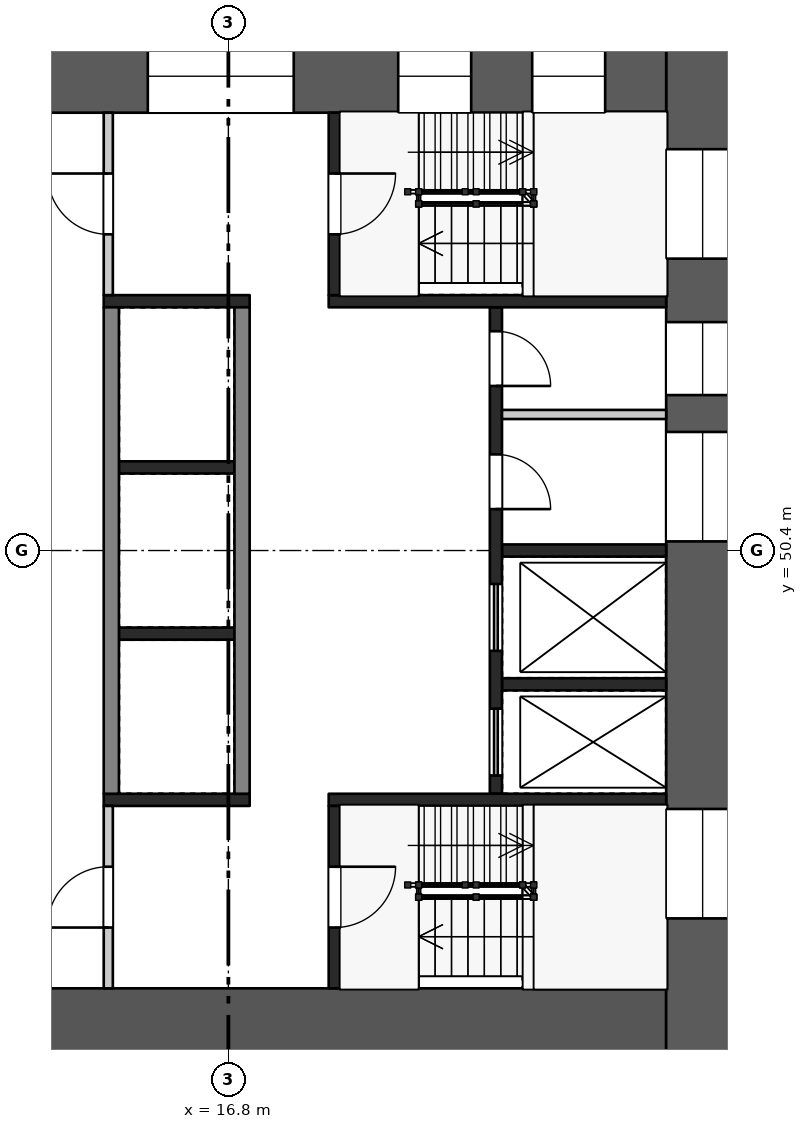
"""IFC4 building model, lengths in metres.
Left out: names, types, materials, properties, quantities, classifications, styles, units other than length and angle.
Written with IfcOpenShell. Run it as: python <this file> out.ifc"""

import sys

from ifc_helpers import new_model, si_unit, direction, frame, frame_2d, origin, place, context, subcontext, project, spatial, rectangle, extrude, element, fill, save


model = new_model("IFC4")
c1 = context("Model", 3, precision=1e-05, world=origin(), true_north=direction((0.0, 1.0)))
c2 = subcontext(c1, "Body", "Model", "MODEL_VIEW")
j1 = project(units=[si_unit("LENGTHUNIT", "METRE"), si_unit("PLANEANGLEUNIT", "RADIAN")], contexts=[c1])
p1 = place(None, origin())
s1 = spatial("IfcSite", under=j1, at=p1, CompositionType="ELEMENT")
p2 = place(p1, origin())
s2 = spatial("IfcBuilding", under=s1, at=p2, CompositionType="ELEMENT")
p3 = place(p2, frame((0.0, 0.0, 14.4)))
s3 = spatial("IfcBuildingStorey", under=s2, at=p3, CompositionType="ELEMENT", Elevation=14.4)
p4 = place(p3, frame((24.6, 58.8, 0.0), z_axis=(0.0, 0.0, 1.0), x_axis=(0.0, -1.0, 0.0)))
e1 = element("IfcWall", 1, at=p4, inside=s3, PredefinedType="SHEAR", context=c2, shape_type="SweptSolid", body=[
    extrude(rectangle(XDim=16.8, YDim=1.2, at=frame_2d((8.4, 0.0))), origin(), (0.0, 0.0, 1.0), 5.1),
])
p5 = place(p4, frame((1.8, 0.0, 0.5)))
e2 = element("IfcOpeningElement", 2, at=p5, cuts=e1, PredefinedType="OPENING", context=c2, shape_type="SweptSolid", body=[
    extrude(rectangle(XDim=1.8, YDim=2.4, at=frame_2d((0.9, 1.2))), frame((0.0, 0.61, 0.0), z_axis=(0.0, -1.0, 0.0), x_axis=(1.0, 0.0, 0.0)), (0.0, 0.0, 1.0), 1.22),
])
p6 = place(p4, frame((4.644, 0.0, 1.6)))
e3 = element("IfcOpeningElement", 3, at=p6, cuts=e1, PredefinedType="OPENING", context=c2, shape_type="SweptSolid", body=[
    extrude(rectangle(XDim=1.2, YDim=1.2, at=frame_2d((0.6, 0.6))), frame((0.0, 0.61, 0.0), z_axis=(0.0, -1.0, 0.0), x_axis=(1.0, 0.0, 0.0)), (0.0, 0.0, 1.0), 1.22),
])
p7 = place(p4, frame((6.45, 0.0, 1.6)))
e4 = element("IfcOpeningElement", 4, at=p7, cuts=e1, PredefinedType="OPENING", context=c2, shape_type="SweptSolid", body=[
    extrude(rectangle(XDim=1.8, YDim=1.2, at=frame_2d((0.9, 0.6))), frame((0.0, 0.61, 0.0), z_axis=(0.0, -1.0, 0.0), x_axis=(1.0, 0.0, 0.0)), (0.0, 0.0, 1.0), 1.22),
])
p8 = place(p4, frame((12.65, 0.0, 0.5)))
e5 = element("IfcOpeningElement", 5, at=p8, cuts=e1, PredefinedType="OPENING", context=c2, shape_type="SweptSolid", body=[
    extrude(rectangle(XDim=1.8, YDim=2.4, at=frame_2d((0.9, 1.2))), frame((0.0, 0.61, 0.0), z_axis=(0.0, -1.0, 0.0), x_axis=(1.0, 0.0, 0.0)), (0.0, 0.0, 1.0), 1.22),
])
p9 = place(p3, frame((9.6, 58.2, 0.0), z_axis=(0.0, 0.0, 1.0), x_axis=(1.0, 0.0, 0.0)))
e6 = element("IfcWall", 6, at=p9, inside=s3, PredefinedType="SHEAR", context=c2, shape_type="SweptSolid", body=[
    extrude(rectangle(XDim=14.4, YDim=1.2, at=frame_2d((7.2, 0.0))), origin(), (0.0, 0.0, 1.0), 5.1),
])
p10 = place(p9, frame((1.105, 0.0, 0.6)))
e7 = element("IfcOpeningElement", 7, at=p10, cuts=e6, PredefinedType="OPENING", context=c2, shape_type="SweptSolid", body=[
    extrude(rectangle(XDim=3.0, YDim=2.1, at=frame_2d((1.5, 1.05))), frame((0.0, 0.61, 0.0), z_axis=(0.0, -1.0, 0.0), x_axis=(1.0, 0.0, 0.0)), (0.0, 0.0, 1.0), 1.22),
])
p11 = place(p9, frame((5.875, 0.0, 0.6)))
e8 = element("IfcOpeningElement", 8, at=p11, cuts=e6, PredefinedType="OPENING", context=c2, shape_type="SweptSolid", body=[
    extrude(rectangle(XDim=2.4, YDim=2.1, at=frame_2d((1.2, 1.05))), frame((0.0, 0.61, 0.0), z_axis=(0.0, -1.0, 0.0), x_axis=(1.0, 0.0, 0.0)), (0.0, 0.0, 1.0), 1.22),
])
p12 = place(p9, frame((9.993, 0.0, 0.5)))
e9 = element("IfcOpeningElement", 9, at=p12, cuts=e6, PredefinedType="OPENING", context=c2, shape_type="SweptSolid", body=[
    extrude(rectangle(XDim=1.2, YDim=2.4, at=frame_2d((0.6, 1.2))), frame((0.0, 0.61, 0.0), z_axis=(0.0, -1.0, 0.0), x_axis=(1.0, 0.0, 0.0)), (0.0, 0.0, 1.0), 1.22),
])
p13 = place(p9, frame((12.197, 0.0, 0.5)))
e10 = element("IfcOpeningElement", 10, at=p13, cuts=e6, PredefinedType="OPENING", context=c2, shape_type="SweptSolid", body=[
    extrude(rectangle(XDim=1.2, YDim=2.4, at=frame_2d((0.6, 1.2))), frame((0.0, 0.61, 0.0), z_axis=(0.0, -1.0, 0.0), x_axis=(1.0, 0.0, 0.0)), (0.0, 0.0, 1.0), 1.22),
])
p14 = place(p3, frame((9.6, 42.6, 0.0), z_axis=(0.0, 0.0, 1.0), x_axis=(1.0, 0.0, 0.0)))
e11 = element("IfcWall", 11, at=p14, inside=s3, PredefinedType="SHEAR", context=c2, shape_type="SweptSolid", body=[
    extrude(rectangle(XDim=14.4, YDim=1.2, at=frame_2d((7.2, 0.0))), origin(), (0.0, 0.0, 1.0), 5.1),
])
p15 = place(p14, frame((2.1, 0.0, 0.0)))
e12 = element("IfcOpeningElement", 12, at=p15, cuts=e11, PredefinedType="OPENING", context=c2, shape_type="SweptSolid", body=[
    extrude(rectangle(XDim=1.8, YDim=2.1, at=frame_2d((0.9, 1.05))), frame((0.0, 0.61, 0.0), z_axis=(0.0, -1.0, 0.0), x_axis=(1.0, 0.0, 0.0)), (0.0, 0.0, 1.0), 1.22),
])
for number, where, z_axis, x_axis in (
    (13, (15.0, 51.767, 0.0), (0.0, 0.0, 1.0), (1.0, 0.0, 0.0)),
    (14, (15.0, 49.033, 0.0), (0.0, 0.0, 1.0), (1.0, 0.0, 0.0)),
):
    element("IfcWall", number, at=place(p3, frame(where, z_axis=z_axis, x_axis=x_axis)), inside=s3, PredefinedType="SHEAR", context=c2, shape_type="SweptSolid", body=[
        extrude(rectangle(XDim=1.9, YDim=0.2, at=frame_2d((0.95, 0.0))), origin(), (0.0, 0.0, 1.0), 5.1),
    ])
for number, where, z_axis, x_axis in (
    (15, (14.875, 54.4, 0.0), (0.0, 0.0, 1.0), (0.0, -1.0, 0.0)),
    (16, (17.025, 54.4, 0.0), (0.0, 0.0, 1.0), (0.0, -1.0, 0.0)),
):
    element("IfcWall", number, at=place(p3, frame(where, z_axis=z_axis, x_axis=x_axis)), inside=s3, PredefinedType="SHEAR", context=c2, shape_type="SweptSolid", body=[
        extrude(rectangle(XDim=8.0, YDim=0.25, at=frame_2d((4.0, 0.0))), origin(), (0.0, 0.0, 1.0), 5.1),
    ])
for number, where, z_axis, x_axis in (
    (17, (21.3, 50.4, 0.0), (0.0, 0.0, 1.0), (1.0, 0.0, 0.0)),
    (18, (21.3, 48.2, 0.0), (0.0, 0.0, 1.0), (1.0, 0.0, 0.0)),
):
    element("IfcWall", number, at=place(p3, frame(where, z_axis=z_axis, x_axis=x_axis)), inside=s3, PredefinedType="SHEAR", context=c2, shape_type="SweptSolid", body=[
        extrude(rectangle(XDim=2.7, YDim=0.2, at=frame_2d((1.35, 0.0))), origin(), (0.0, 0.0, 1.0), 5.1),
    ])
p16 = place(p3, frame((21.3, 52.637, 0.0), z_axis=(0.0, 0.0, 1.0), x_axis=(1.0, 0.0, 0.0)))
e19 = element("IfcWall", 19, at=p16, inside=s3, PredefinedType="PARTITIONING", context=c2, shape_type="SweptSolid", body=[
    extrude(rectangle(XDim=2.7, YDim=0.15, at=frame_2d((1.35, 0.0))), origin(), (0.0, 0.0, 1.0), 5.1),
])
p17 = place(p3, frame((21.2, 54.4, 0.0), z_axis=(0.0, 0.0, 1.0), x_axis=(0.0, -1.0, 0.0)))
e20 = element("IfcWall", 20, at=p17, inside=s3, PredefinedType="SHEAR", context=c2, shape_type="SweptSolid", body=[
    extrude(rectangle(XDim=8.0, YDim=0.2, at=frame_2d((4.0, 0.0))), origin(), (0.0, 0.0, 1.0), 5.1),
])
p18 = place(p17, frame((0.394, 0.0, 0.0)))
e21 = element("IfcOpeningElement", 21, at=p18, cuts=e20, PredefinedType="OPENING", context=c2, shape_type="SweptSolid", body=[
    extrude(rectangle(XDim=0.9, YDim=2.1, at=frame_2d((0.45, 1.05))), frame((0.0, 0.11, 0.0), z_axis=(0.0, -1.0, 0.0), x_axis=(1.0, 0.0, 0.0)), (0.0, 0.0, 1.0), 0.22),
])
p19 = place(p17, frame((2.419, 0.0, 0.0)))
e22 = element("IfcOpeningElement", 22, at=p19, cuts=e20, PredefinedType="OPENING", context=c2, shape_type="SweptSolid", body=[
    extrude(rectangle(XDim=0.9, YDim=2.1, at=frame_2d((0.45, 1.05))), frame((0.0, 0.11, 0.0), z_axis=(0.0, -1.0, 0.0), x_axis=(1.0, 0.0, 0.0)), (0.0, 0.0, 1.0), 0.22),
])
p20 = place(p17, frame((4.55, 0.0, 0.0)))
e23 = element("IfcOpeningElement", 23, at=p20, cuts=e20, PredefinedType="OPENING", context=c2, shape_type="SweptSolid", body=[
    extrude(rectangle(XDim=1.1, YDim=2.1, at=frame_2d((0.55, 1.05))), frame((0.0, 0.11, 0.0), z_axis=(0.0, -1.0, 0.0), x_axis=(1.0, 0.0, 0.0)), (0.0, 0.0, 1.0), 0.22),
])
p21 = place(p17, frame((6.6, 0.0, 0.0)))
e24 = element("IfcOpeningElement", 24, at=p21, cuts=e20, PredefinedType="OPENING", context=c2, shape_type="SweptSolid", body=[
    extrude(rectangle(XDim=1.1, YDim=2.1, at=frame_2d((0.55, 1.05))), frame((0.0, 0.11, 0.0), z_axis=(0.0, -1.0, 0.0), x_axis=(1.0, 0.0, 0.0)), (0.0, 0.0, 1.0), 0.22),
])
p22 = place(p3, frame((14.75, 54.5, 0.0), z_axis=(0.0, 0.0, 1.0), x_axis=(1.0, 0.0, 0.0)))
e25 = element("IfcWall", 25, at=p22, inside=s3, PredefinedType="SHEAR", context=c2, shape_type="SweptSolid", body=[
    extrude(rectangle(XDim=2.4, YDim=0.2, at=frame_2d((1.2, 0.0))), origin(), (0.0, 0.0, 1.0), 5.1),
])
p23 = place(p3, frame((18.45, 54.5, 0.0), z_axis=(0.0, 0.0, 1.0), x_axis=(1.0, 0.0, 0.0)))
e26 = element("IfcWall", 26, at=p23, inside=s3, PredefinedType="SHEAR", context=c2, shape_type="SweptSolid", body=[
    extrude(rectangle(XDim=5.55, YDim=0.2, at=frame_2d((2.775, 0.0))), origin(), (0.0, 0.0, 1.0), 5.1),
])
p24 = place(p3, frame((14.825, 57.6, 0.0), z_axis=(0.0, 0.0, 1.0), x_axis=(0.0, -1.0, 0.0)))
e27 = element("IfcWall", 27, at=p24, inside=s3, PredefinedType="PARTITIONING", context=c2, shape_type="SweptSolid", body=[
    extrude(rectangle(XDim=3.0, YDim=0.15, at=frame_2d((1.5, 0.0))), origin(), (0.0, 0.0, 1.0), 5.1),
])
p25 = place(p24, frame((1.0, 0.0, 0.0)))
e28 = element("IfcOpeningElement", 28, at=p25, cuts=e27, PredefinedType="OPENING", context=c2, shape_type="SweptSolid", body=[
    extrude(rectangle(XDim=1.0, YDim=2.1, at=frame_2d((0.5, 1.05))), frame((0.0, 0.085, 0.0), z_axis=(0.0, -1.0, 0.0), x_axis=(1.0, 0.0, 0.0)), (0.0, 0.0, 1.0), 0.17),
])
p26 = place(p3, frame((18.55, 57.6, 0.0), z_axis=(0.0, 0.0, 1.0), x_axis=(0.0, -1.0, 0.0)))
e29 = element("IfcWall", 29, at=p26, inside=s3, PredefinedType="SHEAR", context=c2, shape_type="SweptSolid", body=[
    extrude(rectangle(XDim=3.0, YDim=0.2, at=frame_2d((1.5, 0.0))), origin(), (0.0, 0.0, 1.0), 5.1),
])
p27 = place(p26, frame((1.0, 0.0, 0.0)))
e30 = element("IfcOpeningElement", 30, at=p27, cuts=e29, PredefinedType="OPENING", context=c2, shape_type="SweptSolid", body=[
    extrude(rectangle(XDim=1.0, YDim=2.1, at=frame_2d((0.5, 1.05))), frame((0.0, 0.11, 0.0), z_axis=(0.0, -1.0, 0.0), x_axis=(1.0, 0.0, 0.0)), (0.0, 0.0, 1.0), 0.22),
])
p28 = place(p3, frame((14.75, 46.3, 0.0), z_axis=(0.0, 0.0, 1.0), x_axis=(1.0, 0.0, 0.0)))
e31 = element("IfcWall", 31, at=p28, inside=s3, PredefinedType="SHEAR", context=c2, shape_type="SweptSolid", body=[
    extrude(rectangle(XDim=2.4, YDim=0.2, at=frame_2d((1.2, 0.0))), origin(), (0.0, 0.0, 1.0), 5.1),
])
p29 = place(p3, frame((18.45, 46.3, 0.0), z_axis=(0.0, 0.0, 1.0), x_axis=(1.0, 0.0, 0.0)))
e32 = element("IfcWall", 32, at=p29, inside=s3, PredefinedType="SHEAR", context=c2, shape_type="SweptSolid", body=[
    extrude(rectangle(XDim=5.55, YDim=0.2, at=frame_2d((2.775, 0.0))), origin(), (0.0, 0.0, 1.0), 5.1),
])
p30 = place(p3, frame((14.825, 46.2, 0.0), z_axis=(0.0, 0.0, 1.0), x_axis=(0.0, -1.0, 0.0)))
e33 = element("IfcWall", 33, at=p30, inside=s3, PredefinedType="PARTITIONING", context=c2, shape_type="SweptSolid", body=[
    extrude(rectangle(XDim=3.0, YDim=0.15, at=frame_2d((1.5, 0.0))), origin(), (0.0, 0.0, 1.0), 5.1),
])
p31 = place(p30, frame((1.0, 0.0, 0.0)))
e34 = element("IfcOpeningElement", 34, at=p31, cuts=e33, PredefinedType="OPENING", context=c2, shape_type="SweptSolid", body=[
    extrude(rectangle(XDim=1.0, YDim=2.1, at=frame_2d((0.5, 1.05))), frame((0.0, 0.085, 0.0), z_axis=(0.0, -1.0, 0.0), x_axis=(1.0, 0.0, 0.0)), (0.0, 0.0, 1.0), 0.17),
])
p32 = place(p3, frame((18.55, 46.2, 0.0), z_axis=(0.0, 0.0, 1.0), x_axis=(0.0, -1.0, 0.0)))
e35 = element("IfcWall", 35, at=p32, inside=s3, PredefinedType="SHEAR", context=c2, shape_type="SweptSolid", body=[
    extrude(rectangle(XDim=3.0, YDim=0.2, at=frame_2d((1.5, 0.0))), origin(), (0.0, 0.0, 1.0), 5.1),
])
p33 = place(p32, frame((1.0, 0.0, 0.0)))
e36 = element("IfcOpeningElement", 36, at=p33, cuts=e35, PredefinedType="OPENING", context=c2, shape_type="SweptSolid", body=[
    extrude(rectangle(XDim=1.0, YDim=2.1, at=frame_2d((0.5, 1.05))), frame((0.0, 0.11, 0.0), z_axis=(0.0, -1.0, 0.0), x_axis=(1.0, 0.0, 0.0)), (0.0, 0.0, 1.0), 0.22),
])
p34 = place(p18, origin())
e37 = element("IfcDoor", 37, at=p34, inside=s3, OperationType="SINGLE_SWING_RIGHT", PredefinedType="DOOR", context=c2, shape_type="SweptSolid", body=[
    extrude(rectangle(XDim=0.9, YDim=2.1, at=frame_2d((0.45, 1.05))), frame((0.0, 0.025, 0.0), z_axis=(0.0, -1.0, 0.0), x_axis=(1.0, 0.0, 0.0)), (0.0, 0.0, 1.0), 0.05),
])
fill(e21, e37)
p35 = place(p19, origin())
e38 = element("IfcDoor", 38, at=p35, inside=s3, OperationType="SINGLE_SWING_RIGHT", PredefinedType="DOOR", context=c2, shape_type="SweptSolid", body=[
    extrude(rectangle(XDim=0.9, YDim=2.1, at=frame_2d((0.45, 1.05))), frame((0.0, 0.025, 0.0), z_axis=(0.0, -1.0, 0.0), x_axis=(1.0, 0.0, 0.0)), (0.0, 0.0, 1.0), 0.05),
])
fill(e22, e38)
p36 = place(p20, origin())
e39 = element("IfcDoor", 39, at=p36, inside=s3, OperationType="DOUBLE_DOOR_SLIDING", PredefinedType="DOOR", context=c2, shape_type="SweptSolid", body=[
    extrude(rectangle(XDim=1.1, YDim=2.1, at=frame_2d((0.55, 1.05))), frame((0.0, 0.025, 0.0), z_axis=(0.0, -1.0, 0.0), x_axis=(1.0, 0.0, 0.0)), (0.0, 0.0, 1.0), 0.05),
])
fill(e23, e39)
p37 = place(p21, origin())
e40 = element("IfcDoor", 40, at=p37, inside=s3, OperationType="DOUBLE_DOOR_SLIDING", PredefinedType="DOOR", context=c2, shape_type="SweptSolid", body=[
    extrude(rectangle(XDim=1.1, YDim=2.1, at=frame_2d((0.55, 1.05))), frame((0.0, 0.025, 0.0), z_axis=(0.0, -1.0, 0.0), x_axis=(1.0, 0.0, 0.0)), (0.0, 0.0, 1.0), 0.05),
])
fill(e24, e40)
p38 = place(p25, frame((1.0, 0.0, 0.0), z_axis=(0.0, 0.0, 1.0), x_axis=(-1.0, 0.0, 0.0)))
e41 = element("IfcDoor", 41, at=p38, inside=s3, OperationType="SINGLE_SWING_RIGHT", PredefinedType="DOOR", context=c2, shape_type="SweptSolid", body=[
    extrude(rectangle(XDim=1.0, YDim=2.1, at=frame_2d((0.5, 1.05))), frame((0.0, 0.025, 0.0), z_axis=(0.0, -1.0, 0.0), x_axis=(1.0, 0.0, 0.0)), (0.0, 0.0, 1.0), 0.05),
])
fill(e28, e41)
p39 = place(p27, origin())
e42 = element("IfcDoor", 42, at=p39, inside=s3, OperationType="SINGLE_SWING_LEFT", PredefinedType="DOOR", context=c2, shape_type="SweptSolid", body=[
    extrude(rectangle(XDim=1.0, YDim=2.1, at=frame_2d((0.5, 1.05))), frame((0.0, 0.025, 0.0), z_axis=(0.0, -1.0, 0.0), x_axis=(1.0, 0.0, 0.0)), (0.0, 0.0, 1.0), 0.05),
])
fill(e30, e42)
p40 = place(p31, frame((1.0, 0.0, 0.0), z_axis=(0.0, 0.0, 1.0), x_axis=(-1.0, 0.0, 0.0)))
e43 = element("IfcDoor", 43, at=p40, inside=s3, OperationType="SINGLE_SWING_LEFT", PredefinedType="DOOR", context=c2, shape_type="SweptSolid", body=[
    extrude(rectangle(XDim=1.0, YDim=2.1, at=frame_2d((0.5, 1.05))), frame((0.0, 0.025, 0.0), z_axis=(0.0, -1.0, 0.0), x_axis=(1.0, 0.0, 0.0)), (0.0, 0.0, 1.0), 0.05),
])
fill(e34, e43)
p41 = place(p33, origin())
e44 = element("IfcDoor", 44, at=p41, inside=s3, OperationType="SINGLE_SWING_LEFT", PredefinedType="DOOR", context=c2, shape_type="SweptSolid", body=[
    extrude(rectangle(XDim=1.0, YDim=2.1, at=frame_2d((0.5, 1.05))), frame((0.0, 0.025, 0.0), z_axis=(0.0, -1.0, 0.0), x_axis=(1.0, 0.0, 0.0)), (0.0, 0.0, 1.0), 0.05),
])
fill(e36, e44)
p42 = place(p5, origin())
e45 = element("IfcWindow", 45, at=p42, inside=s3, PartitioningType="SINGLE_PANEL", PredefinedType="WINDOW", context=c2, shape_type="SweptSolid", body=[
    extrude(rectangle(XDim=1.8, YDim=2.4, at=frame_2d((0.9, 1.2))), frame((0.0, 0.03, 0.0), z_axis=(0.0, -1.0, 0.0), x_axis=(1.0, 0.0, 0.0)), (0.0, 0.0, 1.0), 0.06),
])
fill(e2, e45)
p43 = place(p6, origin())
e46 = element("IfcWindow", 46, at=p43, inside=s3, PartitioningType="SINGLE_PANEL", PredefinedType="WINDOW", context=c2, shape_type="SweptSolid", body=[
    extrude(rectangle(XDim=1.2, YDim=1.2, at=frame_2d((0.6, 0.6))), frame((0.0, 0.03, 0.0), z_axis=(0.0, -1.0, 0.0), x_axis=(1.0, 0.0, 0.0)), (0.0, 0.0, 1.0), 0.06),
])
fill(e3, e46)
p44 = place(p7, origin())
e47 = element("IfcWindow", 47, at=p44, inside=s3, PartitioningType="SINGLE_PANEL", PredefinedType="WINDOW", context=c2, shape_type="SweptSolid", body=[
    extrude(rectangle(XDim=1.8, YDim=1.2, at=frame_2d((0.9, 0.6))), frame((0.0, 0.03, 0.0), z_axis=(0.0, -1.0, 0.0), x_axis=(1.0, 0.0, 0.0)), (0.0, 0.0, 1.0), 0.06),
])
fill(e4, e47)
p45 = place(p8, origin())
e48 = element("IfcWindow", 48, at=p45, inside=s3, PartitioningType="SINGLE_PANEL", PredefinedType="WINDOW", context=c2, shape_type="SweptSolid", body=[
    extrude(rectangle(XDim=1.8, YDim=2.4, at=frame_2d((0.9, 1.2))), frame((0.0, 0.03, 0.0), z_axis=(0.0, -1.0, 0.0), x_axis=(1.0, 0.0, 0.0)), (0.0, 0.0, 1.0), 0.06),
])
fill(e5, e48)
p46 = place(p11, origin())
e49 = element("IfcWindow", 49, at=p46, inside=s3, PartitioningType="SINGLE_PANEL", PredefinedType="WINDOW", context=c2, shape_type="SweptSolid", body=[
    extrude(rectangle(XDim=2.4, YDim=2.1, at=frame_2d((1.2, 1.05))), frame((0.0, 0.03, 0.0), z_axis=(0.0, -1.0, 0.0), x_axis=(1.0, 0.0, 0.0)), (0.0, 0.0, 1.0), 0.06),
])
fill(e8, e49)
p47 = place(p12, origin())
e50 = element("IfcWindow", 50, at=p47, inside=s3, PartitioningType="SINGLE_PANEL", PredefinedType="WINDOW", context=c2, shape_type="SweptSolid", body=[
    extrude(rectangle(XDim=1.2, YDim=2.4, at=frame_2d((0.6, 1.2))), frame((0.0, 0.03, 0.0), z_axis=(0.0, -1.0, 0.0), x_axis=(1.0, 0.0, 0.0)), (0.0, 0.0, 1.0), 0.06),
])
fill(e9, e50)
p48 = place(p13, origin())
e51 = element("IfcWindow", 51, at=p48, inside=s3, PartitioningType="SINGLE_PANEL", PredefinedType="WINDOW", context=c2, shape_type="SweptSolid", body=[
    extrude(rectangle(XDim=1.2, YDim=2.4, at=frame_2d((0.6, 1.2))), frame((0.0, 0.03, 0.0), z_axis=(0.0, -1.0, 0.0), x_axis=(1.0, 0.0, 0.0)), (0.0, 0.0, 1.0), 0.06),
])
fill(e10, e51)
save(model, sys.argv[1])
